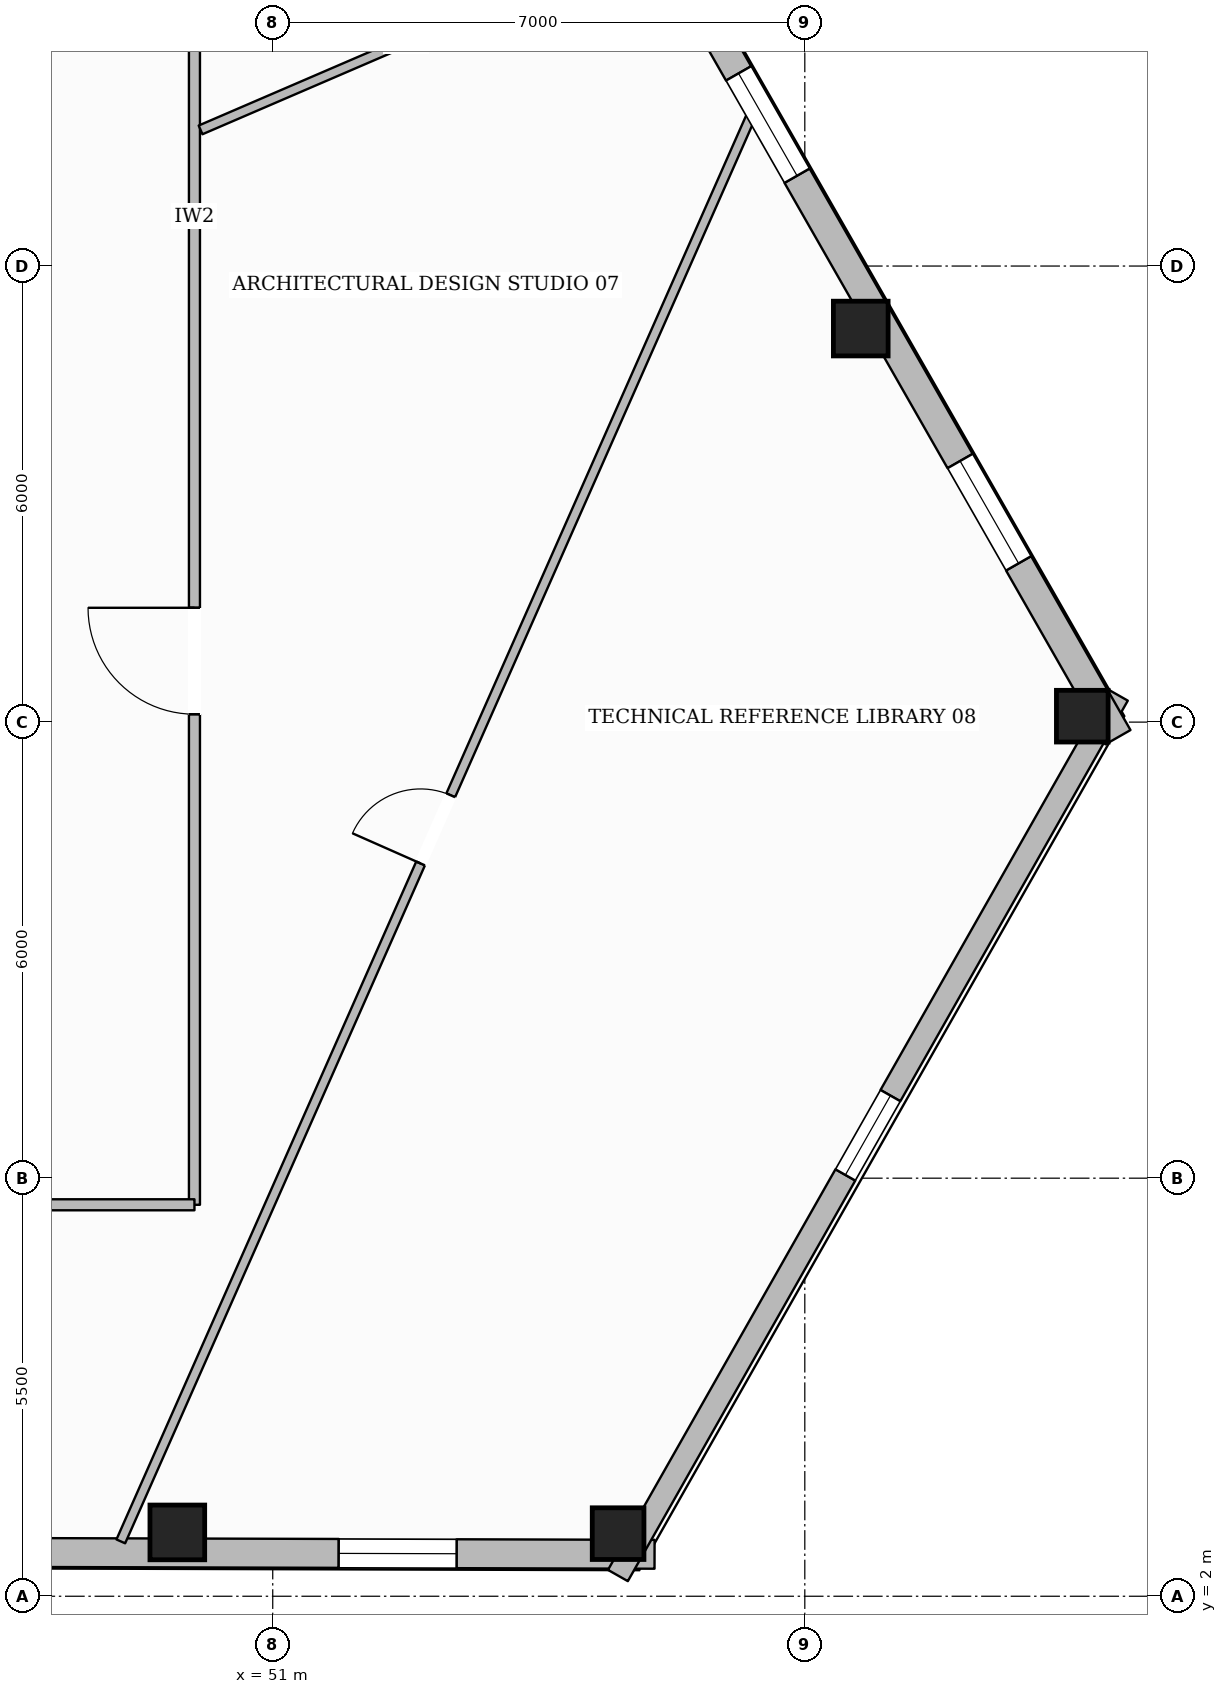
"""IFC4 building model, lengths in metres.
Left out: names, types, materials, properties, quantities, classifications, styles, units other than length and angle.
Written with IfcOpenShell. Run it as: python <this file> out.ifc"""

import sys

from ifc_helpers import new_model, si_unit, direction, frame, frame_2d, origin, origin_2d, place, context, subcontext, project, spatial, rectangle, hollow_rectangle, extrude, element, fill, save


model = new_model("IFC4")
c1 = context("Model", 3, precision=1e-05, world=origin(), true_north=direction((0.0, 1.0)))
c2 = subcontext(c1, "Body", "Model", "MODEL_VIEW")
j1 = project(units=[si_unit("LENGTHUNIT", "METRE"), si_unit("PLANEANGLEUNIT", "RADIAN")], contexts=[c1])
p1 = place(None, origin())
s1 = spatial("IfcSite", under=j1, at=p1, CompositionType="ELEMENT")
p2 = place(p1, origin())
s2 = spatial("IfcBuilding", under=s1, at=p2, CompositionType="ELEMENT")
p3 = place(p2, frame((0.0, 0.0, 97.05)))
s3 = spatial("IfcBuildingStorey", under=s2, at=p3, CompositionType="ELEMENT", Elevation=97.05)
p4 = place(p3, frame((49.745, 2.84, 0.0), z_axis=(0.0, 0.0, 1.0), x_axis=(1.0, 0.0, 0.0)))
e1 = element("IfcColumn", 1, at=p4, inside=s3, PredefinedType="COLUMN", context=c2, shape_type="SweptSolid", body=[
    extrude(hollow_rectangle(XDim=0.72, YDim=0.72, WallThickness=0.032, at=origin_2d()), origin(), (0.0, 0.0, 1.0), 3.6),
])
for number, where, z_axis, x_axis in (
    (2, (55.544, 2.823, 0.0), (0.0, 0.0, 1.0), (1.0, 0.0, 0.0)),
    (3, (61.65, 13.578, 0.0), (0.0, 0.0, 1.0), (1.0, 0.0, 0.0)),
):
    element("IfcColumn", number, at=place(p3, frame(where, z_axis=z_axis, x_axis=x_axis)), inside=s3, PredefinedType="COLUMN", context=c2, shape_type="SweptSolid", body=[
        extrude(hollow_rectangle(XDim=0.68, YDim=0.68, WallThickness=0.03, at=origin_2d()), origin(), (0.0, 0.0, 1.0), 3.6),
    ])
p5 = place(p3, frame((58.736, 18.677, 0.0), z_axis=(0.0, 0.0, 1.0), x_axis=(1.0, 0.0, 0.0)))
e4 = element("IfcColumn", 4, at=p5, inside=s3, PredefinedType="COLUMN", context=c2, shape_type="SweptSolid", body=[
    extrude(hollow_rectangle(XDim=0.72, YDim=0.72, WallThickness=0.032, at=origin_2d()), origin(), (0.0, 0.0, 1.0), 3.6),
])
p6 = place(p3, frame((56.023, 2.552, 0.0), z_axis=(0.0, 0.0, 1.0), x_axis=(-0.999996099517, 0.002793018142, 0.0)))
e5 = element("IfcWall", 5, at=p6, inside=s3, PredefinedType="STANDARD", context=c2, shape_type="SweptSolid", body=[
    extrude(rectangle(XDim=35.751, YDim=0.38, at=frame_2d((17.875, 0.0))), origin(), (0.0, 0.0, 1.0), 3.059),
])
p7 = place(p6, frame((26.213, 0.0, 0.0)))
e6 = element("IfcOpeningElement", 6, at=p7, cuts=e5, PredefinedType="OPENING", context=c2, shape_type="SweptSolid", body=[
    extrude(rectangle(XDim=1.0, YDim=2.2, at=frame_2d((0.5, 1.1))), frame((0.0, 0.2, 0.0), z_axis=(0.0, -1.0, 0.0), x_axis=(1.0, 0.0, 0.0)), (0.0, 0.0, 1.0), 0.4),
])
p8 = place(p6, frame((31.599, 0.0, 0.65)))
e7 = element("IfcOpeningElement", 7, at=p8, cuts=e5, PredefinedType="OPENING", context=c2, shape_type="SweptSolid", body=[
    extrude(rectangle(XDim=1.55, YDim=1.75, at=frame_2d((0.775, 0.875))), frame((0.0, 0.2, 0.0), z_axis=(0.0, -1.0, 0.0), x_axis=(1.0, 0.0, 0.0)), (0.0, 0.0, 1.0), 0.4),
])
p9 = place(p6, frame((20.001, 0.0, 0.65)))
e8 = element("IfcOpeningElement", 8, at=p9, cuts=e5, PredefinedType="OPENING", context=c2, shape_type="SweptSolid", body=[
    extrude(rectangle(XDim=1.55, YDim=1.75, at=frame_2d((0.775, 0.875))), frame((0.0, 0.2, 0.0), z_axis=(0.0, -1.0, 0.0), x_axis=(1.0, 0.0, 0.0)), (0.0, 0.0, 1.0), 0.4),
])
p10 = place(p6, frame((8.404, 0.0, 0.65)))
e9 = element("IfcOpeningElement", 9, at=p10, cuts=e5, PredefinedType="OPENING", context=c2, shape_type="SweptSolid", body=[
    extrude(rectangle(XDim=1.55, YDim=1.75, at=frame_2d((0.775, 0.875))), frame((0.0, 0.2, 0.0), z_axis=(0.0, -1.0, 0.0), x_axis=(1.0, 0.0, 0.0)), (0.0, 0.0, 1.0), 0.4),
])
p11 = place(p6, frame((2.605, 0.0, 0.65)))
e10 = element("IfcOpeningElement", 10, at=p11, cuts=e5, PredefinedType="OPENING", context=c2, shape_type="SweptSolid", body=[
    extrude(rectangle(XDim=1.55, YDim=1.75, at=frame_2d((0.775, 0.875))), frame((0.0, 0.2, 0.0), z_axis=(0.0, -1.0, 0.0), x_axis=(1.0, 0.0, 0.0)), (0.0, 0.0, 1.0), 0.4),
])
p12 = place(p3, frame((62.119, 13.856, 0.0), z_axis=(0.0, 0.0, 1.0), x_axis=(-0.493772602159, -0.869591063292, 0.0)))
e11 = element("IfcWall", 11, at=p12, inside=s3, PredefinedType="STANDARD", context=c2, shape_type="SweptSolid", body=[
    extrude(rectangle(XDim=13.321, YDim=0.3, at=frame_2d((6.661, 0.0))), origin(), (0.0, 0.0, 1.0), 3.059),
])
p13 = place(p12, frame((6.061, 0.0, 0.65)))
e12 = element("IfcOpeningElement", 12, at=p13, cuts=e11, PredefinedType="OPENING", context=c2, shape_type="SweptSolid", body=[
    extrude(rectangle(XDim=1.2, YDim=1.7, at=frame_2d((0.6, 0.85))), frame((0.0, 0.16, 0.0), z_axis=(0.0, -1.0, 0.0), x_axis=(1.0, 0.0, 0.0)), (0.0, 0.0, 1.0), 0.32),
])
p14 = place(p3, frame((44.161, 44.724, 0.0), z_axis=(0.0, 0.0, 1.0), x_axis=(0.496205042728, -0.86820536486, 0.0)))
e13 = element("IfcWall", 13, at=p14, inside=s3, PredefinedType="STANDARD", context=c2, shape_type="SweptSolid", body=[
    extrude(rectangle(XDim=36.193, YDim=0.38, at=frame_2d((18.097, 0.0))), origin(), (0.0, 0.0, 1.0), 3.059),
])
p15 = place(p14, frame((32.008, 0.0, 0.65)))
e14 = element("IfcOpeningElement", 14, at=p15, cuts=e13, PredefinedType="OPENING", context=c2, shape_type="SweptSolid", body=[
    extrude(rectangle(XDim=1.55, YDim=1.75, at=frame_2d((0.775, 0.875))), frame((0.0, 0.2, 0.0), z_axis=(0.0, -1.0, 0.0), x_axis=(1.0, 0.0, 0.0)), (0.0, 0.0, 1.0), 0.4),
])
p16 = place(p14, frame((26.134, 0.0, 0.65)))
e15 = element("IfcOpeningElement", 15, at=p16, cuts=e13, PredefinedType="OPENING", context=c2, shape_type="SweptSolid", body=[
    extrude(rectangle(XDim=1.55, YDim=1.75, at=frame_2d((0.775, 0.875))), frame((0.0, 0.2, 0.0), z_axis=(0.0, -1.0, 0.0), x_axis=(1.0, 0.0, 0.0)), (0.0, 0.0, 1.0), 0.4),
])
p17 = place(p14, frame((20.26, 0.0, 0.65)))
e16 = element("IfcOpeningElement", 16, at=p17, cuts=e13, PredefinedType="OPENING", context=c2, shape_type="SweptSolid", body=[
    extrude(rectangle(XDim=1.55, YDim=1.75, at=frame_2d((0.775, 0.875))), frame((0.0, 0.2, 0.0), z_axis=(0.0, -1.0, 0.0), x_axis=(1.0, 0.0, 0.0)), (0.0, 0.0, 1.0), 0.4),
])
p18 = place(p14, frame((8.513, 0.0, 0.65)))
e17 = element("IfcOpeningElement", 17, at=p18, cuts=e13, PredefinedType="OPENING", context=c2, shape_type="SweptSolid", body=[
    extrude(rectangle(XDim=1.55, YDim=1.75, at=frame_2d((0.775, 0.875))), frame((0.0, 0.2, 0.0), z_axis=(0.0, -1.0, 0.0), x_axis=(1.0, 0.0, 0.0)), (0.0, 0.0, 1.0), 0.4),
])
p19 = place(p14, frame((2.639, 0.0, 0.65)))
e18 = element("IfcOpeningElement", 18, at=p19, cuts=e13, PredefinedType="OPENING", context=c2, shape_type="SweptSolid", body=[
    extrude(rectangle(XDim=1.55, YDim=1.75, at=frame_2d((0.775, 0.875))), frame((0.0, 0.2, 0.0), z_axis=(0.0, -1.0, 0.0), x_axis=(1.0, 0.0, 0.0)), (0.0, 0.0, 1.0), 0.4),
])
p20 = place(p3, frame((49.97, 7.15, 0.0), z_axis=(0.0, 0.0, 1.0), x_axis=(0.0, 1.0, 0.0)))
e19 = element("IfcWall", 19, at=p20, inside=s3, PredefinedType="PARTITIONING", context=c2, shape_type="SweptSolid", body=[
    extrude(rectangle(XDim=17.9, YDim=0.145, at=frame_2d((8.95, 0.0))), origin(), (0.0, 0.0, 1.0), 3.288),
])
p21 = place(p20, frame((6.454, 0.0, 0.0)))
e20 = element("IfcOpeningElement", 20, at=p21, cuts=e19, PredefinedType="OPENING", context=c2, shape_type="SweptSolid", body=[
    extrude(rectangle(XDim=1.4, YDim=2.2, at=frame_2d((0.7, 1.1))), frame((0.0, 0.083, 0.0), z_axis=(0.0, -1.0, 0.0), x_axis=(1.0, 0.0, 0.0)), (0.0, 0.0, 1.0), 0.165),
])
p22 = place(p3, frame((26.03, 7.15, 0.0), z_axis=(0.0, 0.0, 1.0), x_axis=(1.0, 0.0, 0.0)))
e21 = element("IfcWall", 21, at=p22, inside=s3, PredefinedType="PARTITIONING", context=c2, shape_type="SweptSolid", body=[
    extrude(rectangle(XDim=23.94, YDim=0.145, at=frame_2d((11.97, 0.0))), origin(), (0.0, 0.0, 1.0), 3.6),
])
p23 = place(p22, frame((4.53, 0.0, 0.0)))
e22 = element("IfcOpeningElement", 22, at=p23, cuts=e21, PredefinedType="OPENING", context=c2, shape_type="SweptSolid", body=[
    extrude(rectangle(XDim=0.88, YDim=2.1, at=frame_2d((0.44, 1.05))), frame((0.0, 0.083, 0.0), z_axis=(0.0, -1.0, 0.0), x_axis=(1.0, 0.0, 0.0)), (0.0, 0.0, 1.0), 0.165),
])
p24 = place(p22, frame((7.05, 0.0, 0.0)))
e23 = element("IfcOpeningElement", 23, at=p24, cuts=e21, PredefinedType="OPENING", context=c2, shape_type="SweptSolid", body=[
    extrude(rectangle(XDim=0.88, YDim=2.1, at=frame_2d((0.44, 1.05))), frame((0.0, 0.083, 0.0), z_axis=(0.0, -1.0, 0.0), x_axis=(1.0, 0.0, 0.0)), (0.0, 0.0, 1.0), 0.165),
])
p25 = place(p22, frame((9.43, 0.0, 0.0)))
e24 = element("IfcOpeningElement", 24, at=p25, cuts=e21, PredefinedType="OPENING", context=c2, shape_type="SweptSolid", body=[
    extrude(rectangle(XDim=0.96, YDim=2.1, at=frame_2d((0.48, 1.05))), frame((0.0, 0.083, 0.0), z_axis=(0.0, -1.0, 0.0), x_axis=(1.0, 0.0, 0.0)), (0.0, 0.0, 1.0), 0.165),
])
p26 = place(p3, frame((50.051, 21.291, 0.0), z_axis=(0.0, 0.0, 1.0), x_axis=(0.918411455874, 0.395626588741, 0.0)))
e25 = element("IfcWall", 25, at=p26, inside=s3, PredefinedType="PARTITIONING", context=c2, shape_type="SweptSolid", body=[
    extrude(rectangle(XDim=5.883, YDim=0.125, at=frame_2d((2.941, 0.0))), origin(), (0.0, 0.0, 1.0), 3.141),
])
p27 = place(p3, frame((49.001, 2.722, 0.0), z_axis=(0.0, 0.0, 1.0), x_axis=(0.404423778169, 0.914571707222, 0.0)))
e26 = element("IfcWall", 26, at=p27, inside=s3, PredefinedType="PARTITIONING", context=c2, shape_type="SweptSolid", body=[
    extrude(rectangle(XDim=20.485, YDim=0.125, at=frame_2d((10.243, 0.0))), origin(), (0.0, 0.0, 1.0), 3.6),
])
p28 = place(p27, frame((9.752, 0.0, 0.0)))
e27 = element("IfcOpeningElement", 27, at=p28, cuts=e26, PredefinedType="OPENING", context=c2, shape_type="SweptSolid", body=[
    extrude(rectangle(XDim=0.98, YDim=2.15, at=frame_2d((0.49, 1.075))), frame((0.0, 0.073, 0.0), z_axis=(0.0, -1.0, 0.0), x_axis=(1.0, 0.0, 0.0)), (0.0, 0.0, 1.0), 0.145),
])
p29 = place(p11, origin())
e28 = element("IfcWindow", 28, at=p29, inside=s3, PartitioningType="SINGLE_PANEL", PredefinedType="WINDOW", context=c2, shape_type="SweptSolid", body=[
    extrude(rectangle(XDim=1.55, YDim=1.75, at=frame_2d((0.775, 0.875))), frame((0.0, 0.03, 0.0), z_axis=(0.0, -1.0, 0.0), x_axis=(1.0, 0.0, 0.0)), (0.0, 0.0, 1.0), 0.06),
])
fill(e10, e28)
p30 = place(p15, origin())
e29 = element("IfcWindow", 29, at=p30, inside=s3, PartitioningType="SINGLE_PANEL", PredefinedType="WINDOW", context=c2, shape_type="SweptSolid", body=[
    extrude(rectangle(XDim=1.55, YDim=1.75, at=frame_2d((0.775, 0.875))), frame((0.0, 0.03, 0.0), z_axis=(0.0, -1.0, 0.0), x_axis=(1.0, 0.0, 0.0)), (0.0, 0.0, 1.0), 0.06),
])
fill(e14, e29)
p31 = place(p16, origin())
e30 = element("IfcWindow", 30, at=p31, inside=s3, PartitioningType="SINGLE_PANEL", PredefinedType="WINDOW", context=c2, shape_type="SweptSolid", body=[
    extrude(rectangle(XDim=1.55, YDim=1.75, at=frame_2d((0.775, 0.875))), frame((0.0, 0.03, 0.0), z_axis=(0.0, -1.0, 0.0), x_axis=(1.0, 0.0, 0.0)), (0.0, 0.0, 1.0), 0.06),
])
fill(e15, e30)
p32 = place(p13, origin())
e31 = element("IfcWindow", 31, at=p32, inside=s3, PartitioningType="SINGLE_PANEL", PredefinedType="WINDOW", context=c2, shape_type="SweptSolid", body=[
    extrude(rectangle(XDim=1.2, YDim=1.7, at=frame_2d((0.6, 0.85))), frame((0.0, 0.03, 0.0), z_axis=(0.0, -1.0, 0.0), x_axis=(1.0, 0.0, 0.0)), (0.0, 0.0, 1.0), 0.06),
])
fill(e12, e31)
p33 = place(p21, origin())
e32 = element("IfcDoor", 32, at=p33, inside=s3, OperationType="SINGLE_SWING_RIGHT", PredefinedType="DOOR", context=c2, shape_type="SweptSolid", body=[
    extrude(rectangle(XDim=1.4, YDim=2.2, at=frame_2d((0.7, 1.1))), frame((0.0, 0.025, 0.0), z_axis=(0.0, -1.0, 0.0), x_axis=(1.0, 0.0, 0.0)), (0.0, 0.0, 1.0), 0.05),
])
fill(e20, e32)
p34 = place(p28, origin())
e33 = element("IfcDoor", 33, at=p34, inside=s3, OperationType="SINGLE_SWING_LEFT", PredefinedType="DOOR", context=c2, shape_type="SweptSolid", body=[
    extrude(rectangle(XDim=0.98, YDim=2.15, at=frame_2d((0.49, 1.075))), frame((0.0, 0.025, 0.0), z_axis=(0.0, -1.0, 0.0), x_axis=(1.0, 0.0, 0.0)), (0.0, 0.0, 1.0), 0.05),
])
fill(e27, e33)
save(model, sys.argv[1])
